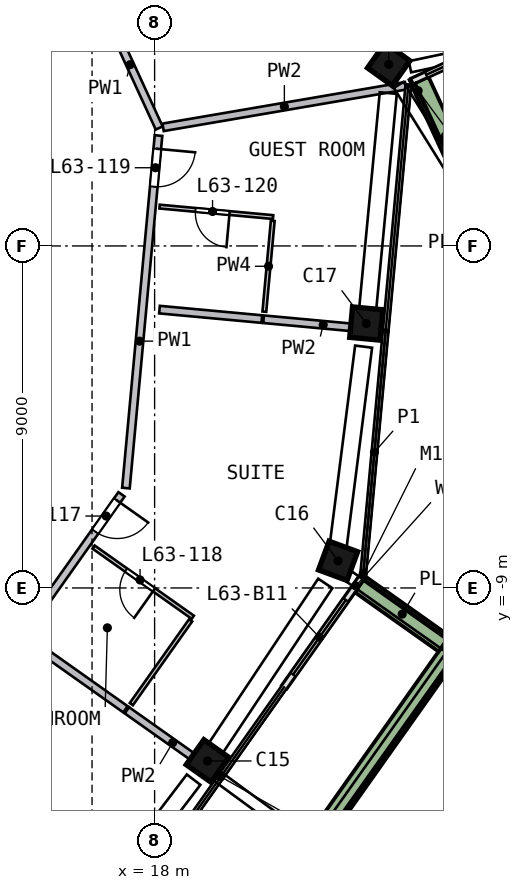
"""IFC4 building model, lengths in metres.
Left out: names, types, materials, properties, quantities, classifications, styles, units other than length and angle.
Written with IfcOpenShell. Run it as: python <this file> out.ifc"""

import sys

from ifc_helpers import new_model, si_unit, direction, frame, frame_2d, origin, origin_2d, place, context, subcontext, project, spatial, rectangle, extrude, element, fill, save


model = new_model("IFC4")
c1 = context("Model", 3, precision=1e-05, world=origin(), true_north=direction((0.0, 1.0)))
c2 = subcontext(c1, "Body", "Model", "MODEL_VIEW")
j1 = project(units=[si_unit("LENGTHUNIT", "METRE"), si_unit("PLANEANGLEUNIT", "RADIAN")], contexts=[c1])
p1 = place(None, origin())
s1 = spatial("IfcSite", under=j1, at=p1, CompositionType="ELEMENT")
p2 = place(p1, origin())
s2 = spatial("IfcBuilding", under=s1, at=p2, CompositionType="ELEMENT")
p3 = place(p2, frame((0.0, 0.0, 256.0)))
s3 = spatial("IfcBuildingStorey", under=s2, at=p3, CompositionType="ELEMENT", Elevation=256.0)
p4 = place(p3, frame((19.313, -13.664, 0.0), z_axis=(0.06418503, 0.092399066, 0.993651194), x_axis=(0.573792389, 0.811237258, -0.112500692)))
e1 = element("IfcColumn", 1, at=p4, inside=s3, PredefinedType="COLUMN", context=c2, shape_type="SweptSolid", body=[
    extrude(rectangle(XDim=0.8, YDim=0.8, at=origin_2d()), origin(), (0.0, 0.0, 1.0), 3.21),
])
p5 = place(p3, frame((22.781, -8.418, 0.0), z_axis=(0.03907537, 0.108711633, 0.993305037), x_axis=(-0.343913051, -0.931868906, 0.115516902)))
e2 = element("IfcColumn", 2, at=p5, inside=s3, PredefinedType="COLUMN", context=c2, shape_type="SweptSolid", body=[
    extrude(rectangle(XDim=0.8, YDim=0.8, at=origin_2d()), origin(), (0.0, 0.0, 1.0), 3.211),
])
p6 = place(p3, frame((23.558, -2.177, 0.0), z_axis=(0.009430042, 0.112095822, 0.993652656), x_axis=(0.091695583, 0.98941317, -0.112487775)))
e3 = element("IfcColumn", 3, at=p6, inside=s3, PredefinedType="COLUMN", context=c2, shape_type="SweptSolid", body=[
    extrude(rectangle(XDim=0.8, YDim=0.8, at=origin_2d()), origin(), (0.0, 0.0, 1.0), 3.21),
])
p7 = place(p3, frame((24.188, 4.64, 0.0), z_axis=(-0.023030322, 0.114847579, 0.993116125), x_axis=(-0.581316565, -0.809719526, 0.080158219)))
e4 = element("IfcColumn", 4, at=p7, inside=s3, PredefinedType="COLUMN", context=c2, shape_type="SweptSolid", body=[
    extrude(rectangle(XDim=0.8, YDim=0.8, at=origin_2d()), origin(), (0.0, 0.0, 1.0), 3.212),
])
p8 = place(p3, frame((21.414, -11.604, 0.0), z_axis=(0.0, 0.0, 1.0), x_axis=(0.577574582, 0.816337922, 0.0)))
e5 = element("IfcWall", 5, at=p8, inside=s3, PredefinedType="SOLIDWALL", context=c2, shape_type="SweptSolid", body=[
    extrude(rectangle(XDim=3.504, YDim=0.15, at=frame_2d((1.752, 0.0))), origin(), (0.0, 0.0, 1.0), 2.525),
])
p9 = place(p8, frame((0.4, 0.0, 0.0)))
e6 = element("IfcOpeningElement", 6, at=p9, cuts=e5, PredefinedType="OPENING", context=c2, shape_type="SweptSolid", body=[
    extrude(rectangle(XDim=2.4, YDim=2.4, at=frame_2d((1.2, 1.2))), frame((0.0, 0.085, 0.0), z_axis=(0.0, -1.0, 0.0), x_axis=(1.0, 0.0, 0.0)), (0.0, 0.0, 1.0), 0.17),
])
p10 = place(p3, frame((24.786, 4.337, 0.0), z_axis=(0.0, 0.0, 1.0), x_axis=(0.908338614, 0.418235535, 0.0)))
e7 = element("IfcWall", 7, at=p10, inside=s3, PredefinedType="SOLIDWALL", context=c2, shape_type="SweptSolid", body=[
    extrude(rectangle(XDim=3.2, YDim=0.15, at=frame_2d((1.6, 0.0))), origin(), (0.0, 0.0, 1.0), 2.525),
])
p11 = place(p10, frame((0.4, 0.0, 0.0)))
e8 = element("IfcOpeningElement", 8, at=p11, cuts=e7, PredefinedType="OPENING", context=c2, shape_type="SweptSolid", body=[
    extrude(rectangle(XDim=2.4, YDim=2.4, at=frame_2d((1.2, 1.2))), frame((0.0, 0.085, 0.0), z_axis=(0.0, -1.0, 0.0), x_axis=(1.0, 0.0, 0.0)), (0.0, 0.0, 1.0), 0.17),
])
p12 = place(p3, frame((18.039, -21.612, 0.0), z_axis=(0.0, 0.0, 1.0), x_axis=(0.577575484, 0.816337283, 0.0)))
e9 = element("IfcWall", 9, at=p12, inside=s3, PredefinedType="SOLIDWALL", context=c2, shape_type="SweptSolid", body=[
    extrude(rectangle(XDim=13.723, YDim=0.5, at=frame_2d((6.862, 0.0))), origin(), (0.0, 0.0, 1.0), 0.7),
])
p13 = place(p3, frame((25.617, -10.468, 0.0), z_axis=(0.0, 0.0, 1.0), x_axis=(-0.816353227, 0.577552948, 0.0)))
e10 = element("IfcWall", 10, at=p13, inside=s3, PredefinedType="SOLIDWALL", context=c2, shape_type="SweptSolid", body=[
    extrude(rectangle(XDim=2.699, YDim=0.5, at=frame_2d((1.35, 0.0))), origin(), (0.0, 0.0, 1.0), 0.7),
])
p14 = place(p3, frame((24.981, 4.344, 0.0), z_axis=(0.0, 0.0, 1.0), x_axis=(0.418225571, -0.908343202, 0.0)))
e11 = element("IfcWall", 11, at=p14, inside=s3, PredefinedType="SOLIDWALL", context=c2, shape_type="SweptSolid", body=[
    extrude(rectangle(XDim=3.199, YDim=0.5, at=frame_2d((1.6, 0.0))), origin(), (0.0, 0.0, 1.0), 0.7),
])
p15 = place(p3, frame((17.129, -6.536, 0.0), z_axis=(0.0, 0.0, 1.0), x_axis=(-0.57757139, -0.81634018, 0.0)))
e12 = element("IfcWall", 12, at=p15, inside=s3, PredefinedType="SOLIDWALL", context=c2, shape_type="SweptSolid", body=[
    extrude(rectangle(XDim=9.115, YDim=0.2, at=frame_2d((4.558, 0.0))), origin(), (0.0, 0.0, 1.0), 3.19),
])
p16 = place(p15, frame((0.2, 0.0, 0.0)))
e13 = element("IfcOpeningElement", 13, at=p16, cuts=e12, PredefinedType="OPENING", context=c2, shape_type="SweptSolid", body=[
    extrude(rectangle(XDim=1.0, YDim=2.1, at=frame_2d((0.5, 1.05))), frame((0.0, 0.11, 0.0), z_axis=(0.0, -1.0, 0.0), x_axis=(1.0, 0.0, 0.0)), (0.0, 0.0, 1.0), 0.22),
])
p17 = place(p3, frame((14.141, 11.749, 0.0), z_axis=(0.0, 0.0, 1.0), x_axis=(0.418187622, -0.908360673, 0.0)))
e14 = element("IfcWall", 14, at=p17, inside=s3, PredefinedType="SOLIDWALL", context=c2, shape_type="SweptSolid", body=[
    extrude(rectangle(XDim=9.517, YDim=0.2, at=frame_2d((4.758, 0.0))), origin(), (0.0, 0.0, 1.0), 3.19),
])
p18 = place(p17, frame((3.848, 0.0, 0.0)))
e15 = element("IfcOpeningElement", 15, at=p18, cuts=e14, PredefinedType="OPENING", context=c2, shape_type="SweptSolid", body=[
    extrude(rectangle(XDim=1.8, YDim=2.1, at=frame_2d((0.9, 1.05))), frame((0.0, 0.11, 0.0), z_axis=(0.0, -1.0, 0.0), x_axis=(1.0, 0.0, 0.0)), (0.0, 0.0, 1.0), 0.22),
])
p19 = place(p3, frame((18.103, 2.905, 0.0), z_axis=(0.0, 0.0, 1.0), x_axis=(-0.092036054, -0.995755675, 0.0)))
e16 = element("IfcWall", 16, at=p19, inside=s3, PredefinedType="SOLIDWALL", context=c2, shape_type="SweptSolid", body=[
    extrude(rectangle(XDim=9.316, YDim=0.2, at=frame_2d((4.658, 0.0))), origin(), (0.0, 0.0, 1.0), 3.19),
])
p20 = place(p19, frame((0.35, 0.0, 0.0)))
e17 = element("IfcOpeningElement", 17, at=p20, cuts=e16, PredefinedType="OPENING", context=c2, shape_type="SweptSolid", body=[
    extrude(rectangle(XDim=1.0, YDim=2.1, at=frame_2d((0.5, 1.05))), frame((0.0, 0.11, 0.0), z_axis=(0.0, -1.0, 0.0), x_axis=(1.0, 0.0, 0.0)), (0.0, 0.0, 1.0), 0.22),
])
p21 = place(p3, frame((14.862, -10.515, 0.0), z_axis=(0.0, 0.0, 1.0), x_axis=(0.816343151, -0.577567191, 0.0)))
e18 = element("IfcWall", 18, at=p21, inside=s3, PredefinedType="SOLIDWALL", context=c2, shape_type="SweptSolid", body=[
    extrude(rectangle(XDim=2.905, YDim=0.2, at=frame_2d((1.452, 0.0))), origin(), (0.0, 0.0, 1.0), 3.19),
])
p22 = place(p3, frame((17.271, -12.219, 0.0), z_axis=(0.0, 0.0, 1.0), x_axis=(0.816307209, -0.577617989, 0.0)))
e19 = element("IfcWall", 19, at=p22, inside=s3, PredefinedType="SOLIDWALL", context=c2, shape_type="SweptSolid", body=[
    extrude(rectangle(XDim=2.952, YDim=0.2, at=frame_2d((1.476, 0.0))), origin(), (0.0, 0.0, 1.0), 3.19),
])
p23 = place(p3, frame((18.128, -1.675, 0.0), z_axis=(0.0, 0.0, 1.0), x_axis=(0.995752176, -0.092073903, 0.0)))
e20 = element("IfcWall", 20, at=p23, inside=s3, PredefinedType="SOLIDWALL", context=c2, shape_type="SweptSolid", body=[
    extrude(rectangle(XDim=2.705, YDim=0.2, at=frame_2d((1.352, 0.0))), origin(), (0.0, 0.0, 1.0), 3.19),
])
p24 = place(p3, frame((24.606, 4.215, 0.0), z_axis=(0.0, 0.0, 1.0), x_axis=(-0.985640008, -0.16886022, 0.0)))
e21 = element("IfcWall", 21, at=p24, inside=s3, PredefinedType="SOLIDWALL", context=c2, shape_type="SweptSolid", body=[
    extrude(rectangle(XDim=6.476, YDim=0.2, at=frame_2d((3.238, 0.0))), origin(), (0.0, 0.0, 1.0), 3.19),
])
p25 = place(p3, frame((20.867, -1.928, 0.0), z_axis=(0.0, 0.0, 1.0), x_axis=(0.995757513, -0.092016173, 0.0)))
e22 = element("IfcWall", 22, at=p25, inside=s3, PredefinedType="SOLIDWALL", context=c2, shape_type="SweptSolid", body=[
    extrude(rectangle(XDim=3.152, YDim=0.2, at=frame_2d((1.576, 0.0))), origin(), (0.0, 0.0, 1.0), 3.19),
])
p26 = place(p3, frame((19.005, -9.771, 0.0), z_axis=(0.0, 0.0, 1.0), x_axis=(-0.816318252, 0.577602382, 0.0)))
e23 = element("IfcWall", 23, at=p26, inside=s3, PredefinedType="PARTITIONING", context=c2, shape_type="SweptSolid", body=[
    extrude(rectangle(XDim=3.2, YDim=0.1, at=frame_2d((1.6, 0.0))), origin(), (0.0, 0.0, 1.0), 3.19),
])
p27 = place(p26, frame((1.25, 0.0, 0.0)))
e24 = element("IfcOpeningElement", 24, at=p27, cuts=e23, PredefinedType="OPENING", context=c2, shape_type="SweptSolid", body=[
    extrude(rectangle(XDim=0.9, YDim=2.1, at=frame_2d((0.45, 1.05))), frame((0.0, 0.06, 0.0), z_axis=(0.0, -1.0, 0.0), x_axis=(1.0, 0.0, 0.0)), (0.0, 0.0, 1.0), 0.12),
])
p28 = place(p3, frame((18.947, -9.853, 0.0), z_axis=(0.0, 0.0, 1.0), x_axis=(-0.57754557, -0.816358447, 0.0)))
e25 = element("IfcWall", 25, at=p28, inside=s3, PredefinedType="PARTITIONING", context=c2, shape_type="SweptSolid", body=[
    extrude(rectangle(XDim=2.7, YDim=0.1, at=frame_2d((1.35, 0.0))), origin(), (0.0, 0.0, 1.0), 3.19),
])
p29 = place(p3, frame((21.118, 0.76, 0.0), z_axis=(0.0, 0.0, 1.0), x_axis=(-0.995762782, 0.091959132, 0.0)))
e26 = element("IfcWall", 26, at=p29, inside=s3, PredefinedType="PARTITIONING", context=c2, shape_type="SweptSolid", body=[
    extrude(rectangle(XDim=3.0, YDim=0.1, at=frame_2d((1.5, 0.0))), origin(), (0.0, 0.0, 1.0), 3.19),
])
p30 = place(p29, frame((1.15, 0.0, 0.0)))
e27 = element("IfcOpeningElement", 27, at=p30, cuts=e26, PredefinedType="OPENING", context=c2, shape_type="SweptSolid", body=[
    extrude(rectangle(XDim=0.9, YDim=2.1, at=frame_2d((0.45, 1.05))), frame((0.0, 0.06, 0.0), z_axis=(0.0, -1.0, 0.0), x_axis=(1.0, 0.0, 0.0)), (0.0, 0.0, 1.0), 0.12),
])
p31 = place(p3, frame((21.109, 0.66, 0.0), z_axis=(0.0, 0.0, 1.0), x_axis=(-0.09205813, -0.995753634, 0.0)))
e28 = element("IfcWall", 28, at=p31, inside=s3, PredefinedType="PARTITIONING", context=c2, shape_type="SweptSolid", body=[
    extrude(rectangle(XDim=2.4, YDim=0.1, at=frame_2d((1.2, 0.0))), origin(), (0.0, 0.0, 1.0), 3.19),
])
p32 = place(p9, origin())
e29 = element("IfcDoor", 29, at=p32, inside=s3, OperationType="SLIDING_TO_RIGHT", PredefinedType="DOOR", context=c2, shape_type="SweptSolid", body=[
    extrude(rectangle(XDim=2.4, YDim=2.4, at=frame_2d((1.2, 1.2))), frame((0.0, 0.025, 0.0), z_axis=(0.0, -1.0, 0.0), x_axis=(1.0, 0.0, 0.0)), (0.0, 0.0, 1.0), 0.05),
])
fill(e6, e29)
p33 = place(p11, origin())
e30 = element("IfcDoor", 30, at=p33, inside=s3, OperationType="SLIDING_TO_LEFT", PredefinedType="DOOR", context=c2, shape_type="SweptSolid", body=[
    extrude(rectangle(XDim=2.4, YDim=2.4, at=frame_2d((1.2, 1.2))), frame((0.0, 0.025, 0.0), z_axis=(0.0, -1.0, 0.0), x_axis=(1.0, 0.0, 0.0)), (0.0, 0.0, 1.0), 0.05),
])
fill(e8, e30)
p34 = place(p16, origin())
e31 = element("IfcDoor", 31, at=p34, inside=s3, OperationType="SINGLE_SWING_LEFT", PredefinedType="DOOR", context=c2, shape_type="SweptSolid", body=[
    extrude(rectangle(XDim=1.0, YDim=2.1, at=frame_2d((0.5, 1.05))), frame((0.0, 0.025, 0.0), z_axis=(0.0, -1.0, 0.0), x_axis=(1.0, 0.0, 0.0)), (0.0, 0.0, 1.0), 0.05),
])
fill(e13, e31)
p35 = place(p27, origin())
e32 = element("IfcDoor", 32, at=p35, inside=s3, OperationType="SINGLE_SWING_LEFT", PredefinedType="DOOR", context=c2, shape_type="SweptSolid", body=[
    extrude(rectangle(XDim=0.9, YDim=2.1, at=frame_2d((0.45, 1.05))), frame((0.0, 0.025, 0.0), z_axis=(0.0, -1.0, 0.0), x_axis=(1.0, 0.0, 0.0)), (0.0, 0.0, 1.0), 0.05),
])
fill(e24, e32)
p36 = place(p20, origin())
e33 = element("IfcDoor", 33, at=p36, inside=s3, OperationType="SINGLE_SWING_LEFT", PredefinedType="DOOR", context=c2, shape_type="SweptSolid", body=[
    extrude(rectangle(XDim=1.0, YDim=2.1, at=frame_2d((0.5, 1.05))), frame((0.0, 0.025, 0.0), z_axis=(0.0, -1.0, 0.0), x_axis=(1.0, 0.0, 0.0)), (0.0, 0.0, 1.0), 0.05),
])
fill(e17, e33)
p37 = place(p30, origin())
e34 = element("IfcDoor", 34, at=p37, inside=s3, OperationType="SINGLE_SWING_LEFT", PredefinedType="DOOR", context=c2, shape_type="SweptSolid", body=[
    extrude(rectangle(XDim=0.9, YDim=2.1, at=frame_2d((0.45, 1.05))), frame((0.0, 0.025, 0.0), z_axis=(0.0, -1.0, 0.0), x_axis=(1.0, 0.0, 0.0)), (0.0, 0.0, 1.0), 0.05),
])
fill(e27, e34)
save(model, sys.argv[1])
